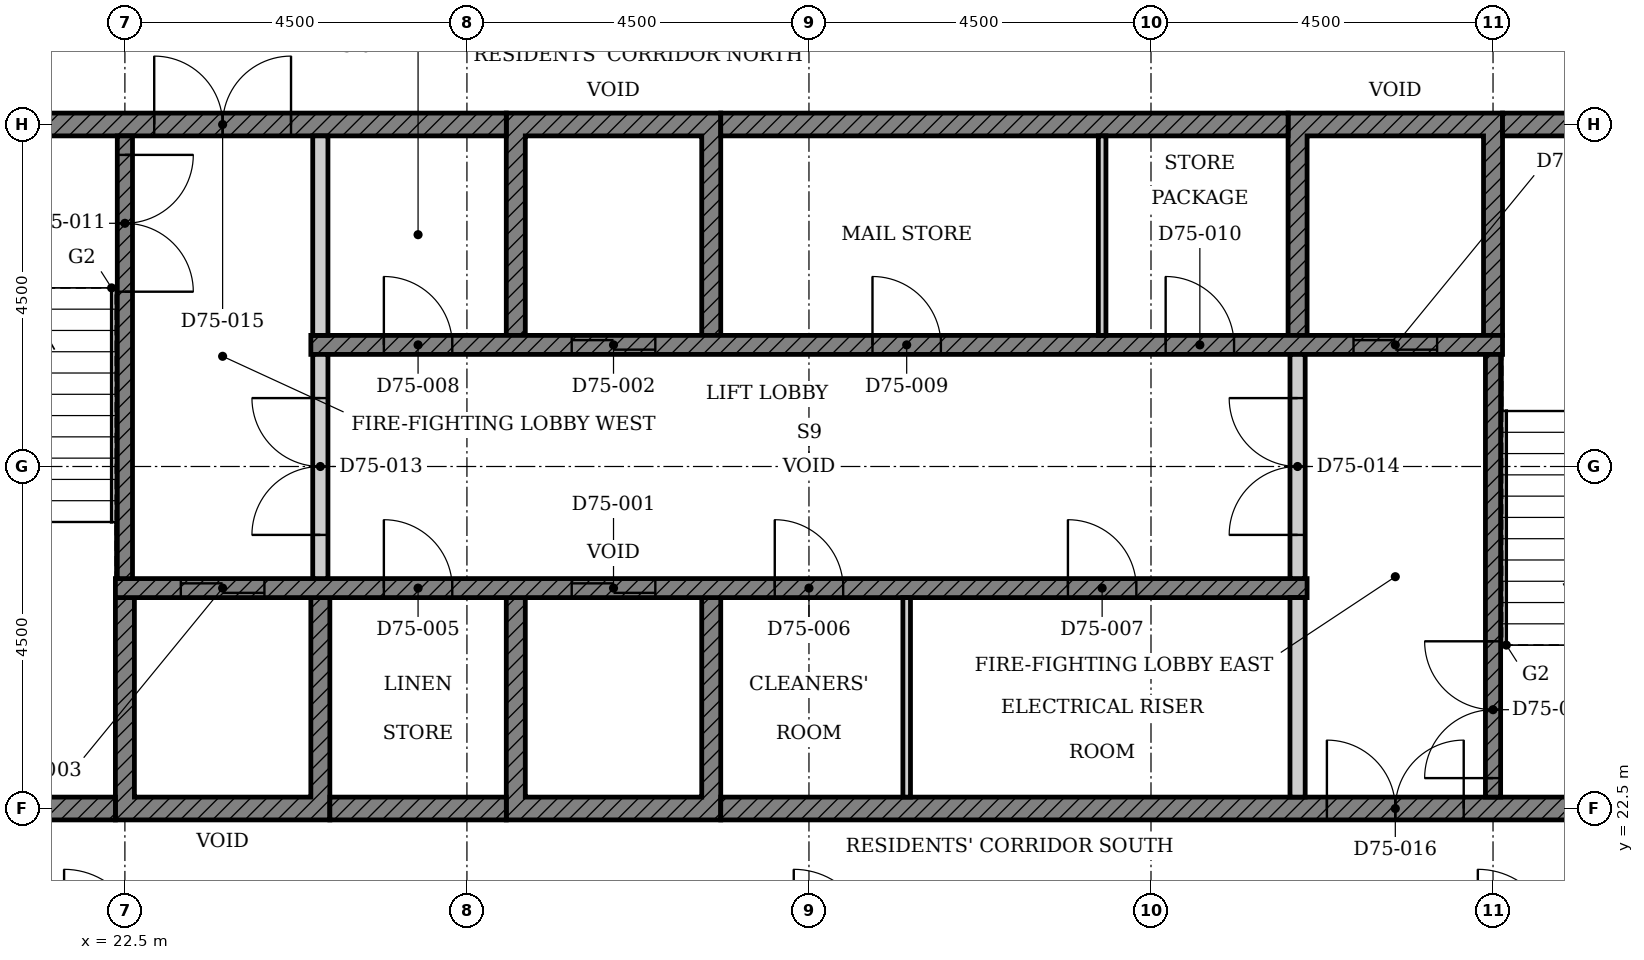
"""IFC4 building model, lengths in metres.
Left out: names, types, materials, properties, quantities, classifications, styles, units other than length and angle.
Written with IfcOpenShell. Run it as: python <this file> out.ifc"""

import sys

from ifc_helpers import new_model, si_unit, direction, frame, frame_2d, origin, place, context, subcontext, project, spatial, polyline, rectangle, outline, extrude, element, fill, save


model = new_model("IFC4")
c1 = context("Model", 3, precision=1e-05, world=origin(), true_north=direction((0.0, 1.0)))
c2 = subcontext(c1, "Body", "Model", "MODEL_VIEW")
j1 = project(units=[si_unit("LENGTHUNIT", "METRE"), si_unit("PLANEANGLEUNIT", "RADIAN")], contexts=[c1])
p1 = place(None, origin())
s1 = spatial("IfcSite", under=j1, at=p1, CompositionType="ELEMENT")
p2 = place(p1, origin())
s2 = spatial("IfcBuilding", under=s1, at=p2, CompositionType="ELEMENT")
p3 = place(p2, frame((0.0, 0.0, 294.5)))
s3 = spatial("IfcBuildingStorey", under=s2, at=p3, CompositionType="ELEMENT", Elevation=294.5)
p4 = place(p3, origin())
e1 = element("IfcWall", 1, at=p4, inside=s3, PredefinedType="SHEAR", context=c2, shape_type="SweptSolid", body=[
    extrude(outline(polyline([(22.375, 22.35), (25.197, 22.35), (25.197, 25.275), (24.947, 25.275), (24.947, 22.65), (22.625, 22.65), (22.625, 25.275), (22.375, 25.275), (22.375, 22.35)])), origin(), (0.0, 0.0, 1.0), 3.4),
])
p5 = place(p3, origin())
e2 = element("IfcWall", 2, at=p5, inside=s3, PredefinedType="SHEAR", context=c2, shape_type="SweptSolid", body=[
    extrude(outline(polyline([(27.518, 22.35), (30.339, 22.35), (30.339, 25.275), (30.089, 25.275), (30.089, 22.65), (27.768, 22.65), (27.768, 25.275), (27.518, 25.275), (27.518, 22.35)])), origin(), (0.0, 0.0, 1.0), 3.4),
])
p6 = place(p3, origin())
e3 = element("IfcWall", 3, at=p6, inside=s3, PredefinedType="SHEAR", context=c2, shape_type="SweptSolid", body=[
    extrude(outline(polyline([(27.518, 28.725), (27.768, 28.725), (27.768, 31.35), (30.089, 31.35), (30.089, 28.725), (30.339, 28.725), (30.339, 31.65), (27.518, 31.65), (27.518, 28.725)])), origin(), (0.0, 0.0, 1.0), 3.4),
])
p7 = place(p3, origin())
e4 = element("IfcWall", 4, at=p7, inside=s3, PredefinedType="SHEAR", context=c2, shape_type="SweptSolid", body=[
    extrude(outline(polyline([(37.803, 28.725), (38.053, 28.725), (38.053, 31.35), (40.375, 31.35), (40.375, 28.725), (40.625, 28.725), (40.625, 31.65), (37.803, 31.65), (37.803, 28.725)])), origin(), (0.0, 0.0, 1.0), 3.4),
])
p8 = place(p3, frame((18.15, 22.5, 0.0), z_axis=(0.0, 0.0, 1.0), x_axis=(1.0, 0.0, 0.0)))
e5 = element("IfcWall", 5, at=p8, inside=s3, PredefinedType="SHEAR", context=c2, shape_type="SweptSolid", body=[
    extrude(rectangle(XDim=4.225, YDim=0.3, at=frame_2d((2.113, 0.0))), origin(), (0.0, 0.0, 1.0), 3.4),
])
p9 = place(p3, frame((25.197, 22.5, 0.0), z_axis=(0.0, 0.0, 1.0), x_axis=(1.0, 0.0, 0.0)))
e6 = element("IfcWall", 6, at=p9, inside=s3, PredefinedType="SHEAR", context=c2, shape_type="SweptSolid", body=[
    extrude(rectangle(XDim=2.321, YDim=0.3, at=frame_2d((1.161, 0.0))), origin(), (0.0, 0.0, 1.0), 3.4),
])
p10 = place(p3, frame((30.339, 22.5, 0.0), z_axis=(0.0, 0.0, 1.0), x_axis=(1.0, 0.0, 0.0)))
e7 = element("IfcWall", 7, at=p10, inside=s3, PredefinedType="SHEAR", context=c2, shape_type="SweptSolid", body=[
    extrude(rectangle(XDim=14.511, YDim=0.3, at=frame_2d((7.255, 0.0))), origin(), (0.0, 0.0, 1.0), 3.4),
])
p11 = place(p10, frame((7.975, 0.0, 0.0)))
e8 = element("IfcOpeningElement", 8, at=p11, cuts=e7, PredefinedType="OPENING", context=c2, shape_type="SweptSolid", body=[
    extrude(rectangle(XDim=1.8, YDim=2.1, at=frame_2d((0.9, 1.05))), frame((0.0, 0.16, 0.0), z_axis=(0.0, -1.0, 0.0), x_axis=(1.0, 0.0, 0.0)), (0.0, 0.0, 1.0), 0.32),
])
p12 = place(p3, frame((18.15, 31.5, 0.0), z_axis=(0.0, 0.0, 1.0), x_axis=(1.0, 0.0, 0.0)))
e9 = element("IfcWall", 9, at=p12, inside=s3, PredefinedType="SHEAR", context=c2, shape_type="SweptSolid", body=[
    extrude(rectangle(XDim=9.368, YDim=0.3, at=frame_2d((4.684, 0.0))), origin(), (0.0, 0.0, 1.0), 3.4),
])
p13 = place(p12, frame((4.736, 0.0, 0.0)))
e10 = element("IfcOpeningElement", 10, at=p13, cuts=e9, PredefinedType="OPENING", context=c2, shape_type="SweptSolid", body=[
    extrude(rectangle(XDim=1.8, YDim=2.1, at=frame_2d((0.9, 1.05))), frame((0.0, 0.16, 0.0), z_axis=(0.0, -1.0, 0.0), x_axis=(1.0, 0.0, 0.0)), (0.0, 0.0, 1.0), 0.32),
])
p14 = place(p3, frame((30.339, 31.5, 0.0), z_axis=(0.0, 0.0, 1.0), x_axis=(1.0, 0.0, 0.0)))
e11 = element("IfcWall", 11, at=p14, inside=s3, PredefinedType="SHEAR", context=c2, shape_type="SweptSolid", body=[
    extrude(rectangle(XDim=7.464, YDim=0.3, at=frame_2d((3.732, 0.0))), origin(), (0.0, 0.0, 1.0), 3.4),
])
p15 = place(p3, frame((40.625, 31.5, 0.0), z_axis=(0.0, 0.0, 1.0), x_axis=(1.0, 0.0, 0.0)))
e12 = element("IfcWall", 12, at=p15, inside=s3, PredefinedType="SHEAR", context=c2, shape_type="SweptSolid", body=[
    extrude(rectangle(XDim=4.225, YDim=0.3, at=frame_2d((2.113, 0.0))), origin(), (0.0, 0.0, 1.0), 3.4),
])
p16 = place(p3, frame((22.375, 25.4, 0.0), z_axis=(0.0, 0.0, 1.0), x_axis=(1.0, 0.0, 0.0)))
e13 = element("IfcWall", 13, at=p16, inside=s3, PredefinedType="SHEAR", context=c2, shape_type="SweptSolid", body=[
    extrude(rectangle(XDim=15.678, YDim=0.25, at=frame_2d((7.839, 0.0))), origin(), (0.0, 0.0, 1.0), 3.4),
])
p17 = place(p16, frame((6.004, 0.0, 0.0)))
e14 = element("IfcOpeningElement", 14, at=p17, cuts=e13, PredefinedType="OPENING", context=c2, shape_type="SweptSolid", body=[
    extrude(rectangle(XDim=1.1, YDim=2.1, at=frame_2d((0.55, 1.05))), frame((0.0, 0.135, 0.0), z_axis=(0.0, -1.0, 0.0), x_axis=(1.0, 0.0, 0.0)), (0.0, 0.0, 1.0), 0.27),
])
p18 = place(p16, frame((0.861, 0.0, 0.0)))
e15 = element("IfcOpeningElement", 15, at=p18, cuts=e13, PredefinedType="OPENING", context=c2, shape_type="SweptSolid", body=[
    extrude(rectangle(XDim=1.1, YDim=2.1, at=frame_2d((0.55, 1.05))), frame((0.0, 0.135, 0.0), z_axis=(0.0, -1.0, 0.0), x_axis=(1.0, 0.0, 0.0)), (0.0, 0.0, 1.0), 0.27),
])
p19 = place(p16, frame((3.532, 0.0, 0.0)))
e16 = element("IfcOpeningElement", 16, at=p19, cuts=e13, PredefinedType="OPENING", context=c2, shape_type="SweptSolid", body=[
    extrude(rectangle(XDim=0.9, YDim=2.1, at=frame_2d((0.45, 1.05))), frame((0.0, 0.135, 0.0), z_axis=(0.0, -1.0, 0.0), x_axis=(1.0, 0.0, 0.0)), (0.0, 0.0, 1.0), 0.27),
])
p20 = place(p16, frame((8.675, 0.0, 0.0)))
e17 = element("IfcOpeningElement", 17, at=p20, cuts=e13, PredefinedType="OPENING", context=c2, shape_type="SweptSolid", body=[
    extrude(rectangle(XDim=0.9, YDim=2.1, at=frame_2d((0.45, 1.05))), frame((0.0, 0.135, 0.0), z_axis=(0.0, -1.0, 0.0), x_axis=(1.0, 0.0, 0.0)), (0.0, 0.0, 1.0), 0.27),
])
p21 = place(p16, frame((12.532, 0.0, 0.0)))
e18 = element("IfcOpeningElement", 18, at=p21, cuts=e13, PredefinedType="OPENING", context=c2, shape_type="SweptSolid", body=[
    extrude(rectangle(XDim=0.9, YDim=2.1, at=frame_2d((0.45, 1.05))), frame((0.0, 0.135, 0.0), z_axis=(0.0, -1.0, 0.0), x_axis=(1.0, 0.0, 0.0)), (0.0, 0.0, 1.0), 0.27),
])
p22 = place(p3, frame((24.947, 28.6, 0.0), z_axis=(0.0, 0.0, 1.0), x_axis=(1.0, 0.0, 0.0)))
e19 = element("IfcWall", 19, at=p22, inside=s3, PredefinedType="SHEAR", context=c2, shape_type="SweptSolid", body=[
    extrude(rectangle(XDim=15.678, YDim=0.25, at=frame_2d((7.839, 0.0))), origin(), (0.0, 0.0, 1.0), 3.4),
])
p23 = place(p22, frame((3.432, 0.0, 0.0)))
e20 = element("IfcOpeningElement", 20, at=p23, cuts=e19, PredefinedType="OPENING", context=c2, shape_type="SweptSolid", body=[
    extrude(rectangle(XDim=1.1, YDim=2.1, at=frame_2d((0.55, 1.05))), frame((0.0, 0.135, 0.0), z_axis=(0.0, -1.0, 0.0), x_axis=(1.0, 0.0, 0.0)), (0.0, 0.0, 1.0), 0.27),
])
p24 = place(p22, frame((13.718, 0.0, 0.0)))
e21 = element("IfcOpeningElement", 21, at=p24, cuts=e19, PredefinedType="OPENING", context=c2, shape_type="SweptSolid", body=[
    extrude(rectangle(XDim=1.1, YDim=2.1, at=frame_2d((0.55, 1.05))), frame((0.0, 0.135, 0.0), z_axis=(0.0, -1.0, 0.0), x_axis=(1.0, 0.0, 0.0)), (0.0, 0.0, 1.0), 0.27),
])
p25 = place(p22, frame((0.961, 0.0, 0.0)))
e22 = element("IfcOpeningElement", 22, at=p25, cuts=e19, PredefinedType="OPENING", context=c2, shape_type="SweptSolid", body=[
    extrude(rectangle(XDim=0.9, YDim=2.1, at=frame_2d((0.45, 1.05))), frame((0.0, 0.135, 0.0), z_axis=(0.0, -1.0, 0.0), x_axis=(1.0, 0.0, 0.0)), (0.0, 0.0, 1.0), 0.27),
])
p26 = place(p22, frame((7.389, 0.0, 0.0)))
e23 = element("IfcOpeningElement", 23, at=p26, cuts=e19, PredefinedType="OPENING", context=c2, shape_type="SweptSolid", body=[
    extrude(rectangle(XDim=0.9, YDim=2.1, at=frame_2d((0.45, 1.05))), frame((0.0, 0.135, 0.0), z_axis=(0.0, -1.0, 0.0), x_axis=(1.0, 0.0, 0.0)), (0.0, 0.0, 1.0), 0.27),
])
p27 = place(p22, frame((11.246, 0.0, 0.0)))
e24 = element("IfcOpeningElement", 24, at=p27, cuts=e19, PredefinedType="OPENING", context=c2, shape_type="SweptSolid", body=[
    extrude(rectangle(XDim=0.9, YDim=2.1, at=frame_2d((0.45, 1.05))), frame((0.0, 0.135, 0.0), z_axis=(0.0, -1.0, 0.0), x_axis=(1.0, 0.0, 0.0)), (0.0, 0.0, 1.0), 0.27),
])
p28 = place(p3, frame((37.928, 22.65, 0.0), z_axis=(0.0, 0.0, 1.0), x_axis=(0.0, 1.0, 0.0)))
e25 = element("IfcWall", 25, at=p28, inside=s3, PredefinedType="PARTITIONING", context=c2, shape_type="SweptSolid", body=[
    extrude(rectangle(XDim=2.625, YDim=0.2, at=frame_2d((1.312, 0.0))), origin(), (0.0, 0.0, 1.0), 3.4),
])
p29 = place(p3, frame((32.786, 22.65, 0.0), z_axis=(0.0, 0.0, 1.0), x_axis=(0.0, 1.0, 0.0)))
e26 = element("IfcWall", 26, at=p29, inside=s3, PredefinedType="PARTITIONING", context=c2, shape_type="SweptSolid", body=[
    extrude(rectangle(XDim=2.625, YDim=0.1, at=frame_2d((1.312, 0.0))), origin(), (0.0, 0.0, 1.0), 3.4),
])
p30 = place(p3, frame((25.072, 28.725, 0.0), z_axis=(0.0, 0.0, 1.0), x_axis=(0.0, 1.0, 0.0)))
e27 = element("IfcWall", 27, at=p30, inside=s3, PredefinedType="PARTITIONING", context=c2, shape_type="SweptSolid", body=[
    extrude(rectangle(XDim=2.625, YDim=0.2, at=frame_2d((1.312, 0.0))), origin(), (0.0, 0.0, 1.0), 3.4),
])
p31 = place(p3, frame((35.357, 28.725, 0.0), z_axis=(0.0, 0.0, 1.0), x_axis=(0.0, 1.0, 0.0)))
e28 = element("IfcWall", 28, at=p31, inside=s3, PredefinedType="PARTITIONING", context=c2, shape_type="SweptSolid", body=[
    extrude(rectangle(XDim=2.625, YDim=0.1, at=frame_2d((1.312, 0.0))), origin(), (0.0, 0.0, 1.0), 3.4),
])
p32 = place(p3, frame((22.5, 31.35, 0.0), z_axis=(0.0, 0.0, 1.0), x_axis=(0.0, -1.0, 0.0)))
e29 = element("IfcWall", 29, at=p32, inside=s3, PredefinedType="SHEAR", context=c2, shape_type="SweptSolid", body=[
    extrude(rectangle(XDim=5.825, YDim=0.2, at=frame_2d((2.913, 0.0))), origin(), (0.0, 0.0, 1.0), 3.4),
])
p33 = place(p32, frame((0.25, 0.0, 0.0)))
e30 = element("IfcOpeningElement", 30, at=p33, cuts=e29, PredefinedType="OPENING", context=c2, shape_type="SweptSolid", body=[
    extrude(rectangle(XDim=1.8, YDim=2.1, at=frame_2d((0.9, 1.05))), frame((0.0, 0.11, 0.0), z_axis=(0.0, -1.0, 0.0), x_axis=(1.0, 0.0, 0.0)), (0.0, 0.0, 1.0), 0.22),
])
p34 = place(p3, frame((40.5, 22.65, 0.0), z_axis=(0.0, 0.0, 1.0), x_axis=(0.0, 1.0, 0.0)))
e31 = element("IfcWall", 31, at=p34, inside=s3, PredefinedType="SHEAR", context=c2, shape_type="SweptSolid", body=[
    extrude(rectangle(XDim=5.825, YDim=0.2, at=frame_2d((2.913, 0.0))), origin(), (0.0, 0.0, 1.0), 3.4),
])
p35 = place(p34, frame((0.25, 0.0, 0.0)))
e32 = element("IfcOpeningElement", 32, at=p35, cuts=e31, PredefinedType="OPENING", context=c2, shape_type="SweptSolid", body=[
    extrude(rectangle(XDim=1.8, YDim=2.1, at=frame_2d((0.9, 1.05))), frame((0.0, 0.11, 0.0), z_axis=(0.0, -1.0, 0.0), x_axis=(1.0, 0.0, 0.0)), (0.0, 0.0, 1.0), 0.22),
])
p36 = place(p3, frame((25.072, 25.525, 0.0), z_axis=(0.0, 0.0, 1.0), x_axis=(0.0, 1.0, 0.0)))
e33 = element("IfcWall", 33, at=p36, inside=s3, PredefinedType="PARTITIONING", context=c2, shape_type="SweptSolid", body=[
    extrude(rectangle(XDim=2.95, YDim=0.2, at=frame_2d((1.475, 0.0))), origin(), (0.0, 0.0, 1.0), 3.4),
])
p37 = place(p36, frame((0.575, 0.0, 0.0)))
e34 = element("IfcOpeningElement", 34, at=p37, cuts=e33, PredefinedType="OPENING", context=c2, shape_type="SweptSolid", body=[
    extrude(rectangle(XDim=1.8, YDim=2.1, at=frame_2d((0.9, 1.05))), frame((0.0, 0.11, 0.0), z_axis=(0.0, -1.0, 0.0), x_axis=(1.0, 0.0, 0.0)), (0.0, 0.0, 1.0), 0.22),
])
p38 = place(p3, frame((37.928, 25.525, 0.0), z_axis=(0.0, 0.0, 1.0), x_axis=(0.0, 1.0, 0.0)))
e35 = element("IfcWall", 35, at=p38, inside=s3, PredefinedType="PARTITIONING", context=c2, shape_type="SweptSolid", body=[
    extrude(rectangle(XDim=2.95, YDim=0.2, at=frame_2d((1.475, 0.0))), origin(), (0.0, 0.0, 1.0), 3.4),
])
p39 = place(p38, frame((0.575, 0.0, 0.0)))
e36 = element("IfcOpeningElement", 36, at=p39, cuts=e35, PredefinedType="OPENING", context=c2, shape_type="SweptSolid", body=[
    extrude(rectangle(XDim=1.8, YDim=2.1, at=frame_2d((0.9, 1.05))), frame((0.0, 0.11, 0.0), z_axis=(0.0, -1.0, 0.0), x_axis=(1.0, 0.0, 0.0)), (0.0, 0.0, 1.0), 0.22),
])
p40 = place(p17, origin())
e37 = element("IfcDoor", 37, at=p40, inside=s3, OperationType="DOUBLE_DOOR_SLIDING", PredefinedType="DOOR", context=c2, shape_type="SweptSolid", body=[
    extrude(rectangle(XDim=1.1, YDim=2.1, at=frame_2d((0.55, 1.05))), frame((0.0, 0.025, 0.0), z_axis=(0.0, -1.0, 0.0), x_axis=(1.0, 0.0, 0.0)), (0.0, 0.0, 1.0), 0.05),
])
fill(e14, e37)
p41 = place(p23, origin())
e38 = element("IfcDoor", 38, at=p41, inside=s3, OperationType="DOUBLE_DOOR_SLIDING", PredefinedType="DOOR", context=c2, shape_type="SweptSolid", body=[
    extrude(rectangle(XDim=1.1, YDim=2.1, at=frame_2d((0.55, 1.05))), frame((0.0, 0.025, 0.0), z_axis=(0.0, -1.0, 0.0), x_axis=(1.0, 0.0, 0.0)), (0.0, 0.0, 1.0), 0.05),
])
fill(e20, e38)
p42 = place(p18, origin())
e39 = element("IfcDoor", 39, at=p42, inside=s3, OperationType="DOUBLE_DOOR_SLIDING", PredefinedType="DOOR", context=c2, shape_type="SweptSolid", body=[
    extrude(rectangle(XDim=1.1, YDim=2.1, at=frame_2d((0.55, 1.05))), frame((0.0, 0.025, 0.0), z_axis=(0.0, -1.0, 0.0), x_axis=(1.0, 0.0, 0.0)), (0.0, 0.0, 1.0), 0.05),
])
fill(e15, e39)
p43 = place(p24, origin())
e40 = element("IfcDoor", 40, at=p43, inside=s3, OperationType="DOUBLE_DOOR_SLIDING", PredefinedType="DOOR", context=c2, shape_type="SweptSolid", body=[
    extrude(rectangle(XDim=1.1, YDim=2.1, at=frame_2d((0.55, 1.05))), frame((0.0, 0.025, 0.0), z_axis=(0.0, -1.0, 0.0), x_axis=(1.0, 0.0, 0.0)), (0.0, 0.0, 1.0), 0.05),
])
fill(e21, e40)
p44 = place(p19, origin())
e41 = element("IfcDoor", 41, at=p44, inside=s3, OperationType="SINGLE_SWING_LEFT", PredefinedType="DOOR", context=c2, shape_type="SweptSolid", body=[
    extrude(rectangle(XDim=0.9, YDim=2.1, at=frame_2d((0.45, 1.05))), frame((0.0, 0.025, 0.0), z_axis=(0.0, -1.0, 0.0), x_axis=(1.0, 0.0, 0.0)), (0.0, 0.0, 1.0), 0.05),
])
fill(e16, e41)
p45 = place(p20, origin())
e42 = element("IfcDoor", 42, at=p45, inside=s3, OperationType="SINGLE_SWING_LEFT", PredefinedType="DOOR", context=c2, shape_type="SweptSolid", body=[
    extrude(rectangle(XDim=0.9, YDim=2.1, at=frame_2d((0.45, 1.05))), frame((0.0, 0.025, 0.0), z_axis=(0.0, -1.0, 0.0), x_axis=(1.0, 0.0, 0.0)), (0.0, 0.0, 1.0), 0.05),
])
fill(e17, e42)
p46 = place(p21, origin())
e43 = element("IfcDoor", 43, at=p46, inside=s3, OperationType="SINGLE_SWING_LEFT", PredefinedType="DOOR", context=c2, shape_type="SweptSolid", body=[
    extrude(rectangle(XDim=0.9, YDim=2.1, at=frame_2d((0.45, 1.05))), frame((0.0, 0.025, 0.0), z_axis=(0.0, -1.0, 0.0), x_axis=(1.0, 0.0, 0.0)), (0.0, 0.0, 1.0), 0.05),
])
fill(e18, e43)
p47 = place(p25, origin())
e44 = element("IfcDoor", 44, at=p47, inside=s3, OperationType="SINGLE_SWING_LEFT", PredefinedType="DOOR", context=c2, shape_type="SweptSolid", body=[
    extrude(rectangle(XDim=0.9, YDim=2.1, at=frame_2d((0.45, 1.05))), frame((0.0, 0.025, 0.0), z_axis=(0.0, -1.0, 0.0), x_axis=(1.0, 0.0, 0.0)), (0.0, 0.0, 1.0), 0.05),
])
fill(e22, e44)
p48 = place(p26, origin())
e45 = element("IfcDoor", 45, at=p48, inside=s3, OperationType="SINGLE_SWING_LEFT", PredefinedType="DOOR", context=c2, shape_type="SweptSolid", body=[
    extrude(rectangle(XDim=0.9, YDim=2.1, at=frame_2d((0.45, 1.05))), frame((0.0, 0.025, 0.0), z_axis=(0.0, -1.0, 0.0), x_axis=(1.0, 0.0, 0.0)), (0.0, 0.0, 1.0), 0.05),
])
fill(e23, e45)
p49 = place(p27, origin())
e46 = element("IfcDoor", 46, at=p49, inside=s3, OperationType="SINGLE_SWING_LEFT", PredefinedType="DOOR", context=c2, shape_type="SweptSolid", body=[
    extrude(rectangle(XDim=0.9, YDim=2.1, at=frame_2d((0.45, 1.05))), frame((0.0, 0.025, 0.0), z_axis=(0.0, -1.0, 0.0), x_axis=(1.0, 0.0, 0.0)), (0.0, 0.0, 1.0), 0.05),
])
fill(e24, e46)
p50 = place(p33, origin())
e47 = element("IfcDoor", 47, at=p50, inside=s3, OperationType="DOUBLE_DOOR_SINGLE_SWING", PredefinedType="DOOR", context=c2, shape_type="SweptSolid", body=[
    extrude(rectangle(XDim=1.8, YDim=2.1, at=frame_2d((0.9, 1.05))), frame((0.0, 0.025, 0.0), z_axis=(0.0, -1.0, 0.0), x_axis=(1.0, 0.0, 0.0)), (0.0, 0.0, 1.0), 0.05),
])
fill(e30, e47)
p51 = place(p35, origin())
e48 = element("IfcDoor", 48, at=p51, inside=s3, OperationType="DOUBLE_DOOR_SINGLE_SWING", PredefinedType="DOOR", context=c2, shape_type="SweptSolid", body=[
    extrude(rectangle(XDim=1.8, YDim=2.1, at=frame_2d((0.9, 1.05))), frame((0.0, 0.025, 0.0), z_axis=(0.0, -1.0, 0.0), x_axis=(1.0, 0.0, 0.0)), (0.0, 0.0, 1.0), 0.05),
])
fill(e32, e48)
p52 = place(p37, origin())
e49 = element("IfcDoor", 49, at=p52, inside=s3, OperationType="DOUBLE_DOOR_SINGLE_SWING", PredefinedType="DOOR", context=c2, shape_type="SweptSolid", body=[
    extrude(rectangle(XDim=1.8, YDim=2.1, at=frame_2d((0.9, 1.05))), frame((0.0, 0.025, 0.0), z_axis=(0.0, -1.0, 0.0), x_axis=(1.0, 0.0, 0.0)), (0.0, 0.0, 1.0), 0.05),
])
fill(e34, e49)
p53 = place(p39, origin())
e50 = element("IfcDoor", 50, at=p53, inside=s3, OperationType="DOUBLE_DOOR_SINGLE_SWING", PredefinedType="DOOR", context=c2, shape_type="SweptSolid", body=[
    extrude(rectangle(XDim=1.8, YDim=2.1, at=frame_2d((0.9, 1.05))), frame((0.0, 0.025, 0.0), z_axis=(0.0, -1.0, 0.0), x_axis=(1.0, 0.0, 0.0)), (0.0, 0.0, 1.0), 0.05),
])
fill(e36, e50)
p54 = place(p13, origin())
e51 = element("IfcDoor", 51, at=p54, inside=s3, OperationType="DOUBLE_DOOR_SINGLE_SWING", PredefinedType="DOOR", context=c2, shape_type="SweptSolid", body=[
    extrude(rectangle(XDim=1.8, YDim=2.1, at=frame_2d((0.9, 1.05))), frame((0.0, 0.025, 0.0), z_axis=(0.0, -1.0, 0.0), x_axis=(1.0, 0.0, 0.0)), (0.0, 0.0, 1.0), 0.05),
])
fill(e10, e51)
p55 = place(p11, origin())
e52 = element("IfcDoor", 52, at=p55, inside=s3, OperationType="DOUBLE_DOOR_SINGLE_SWING", PredefinedType="DOOR", context=c2, shape_type="SweptSolid", body=[
    extrude(rectangle(XDim=1.8, YDim=2.1, at=frame_2d((0.9, 1.05))), frame((0.0, 0.025, 0.0), z_axis=(0.0, -1.0, 0.0), x_axis=(1.0, 0.0, 0.0)), (0.0, 0.0, 1.0), 0.05),
])
fill(e8, e52)
save(model, sys.argv[1])
